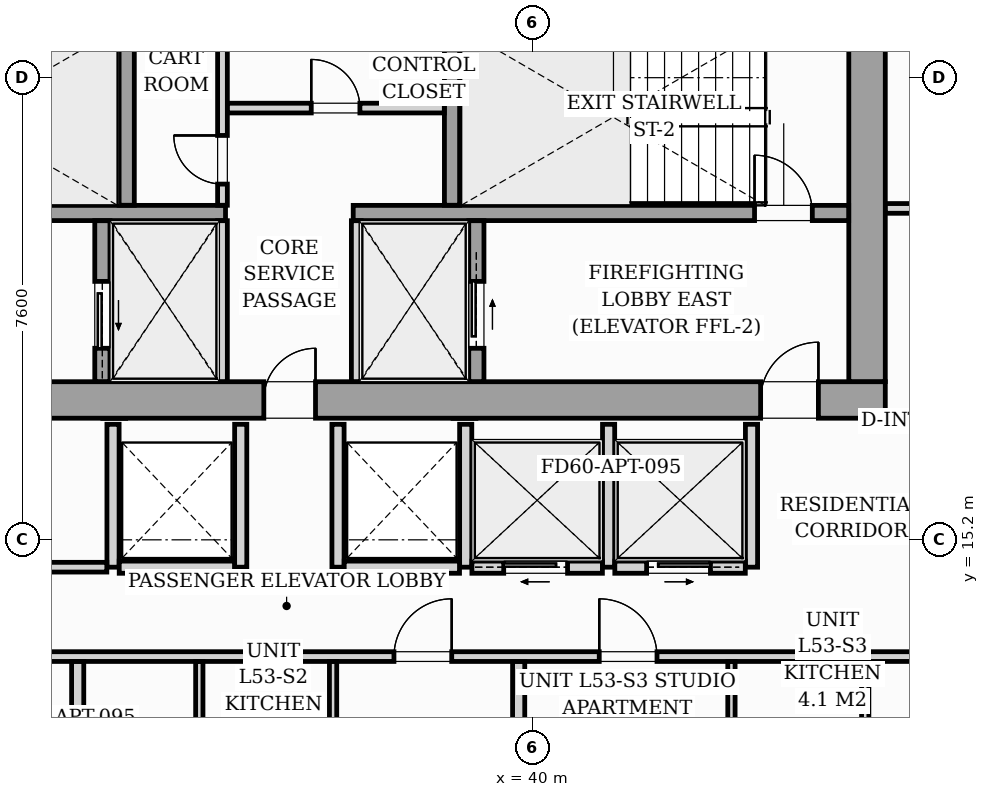
"""IFC4 building model, lengths in metres.
Left out: names, types, materials, properties, quantities, classifications, styles, units other than length and angle.
Written with IfcOpenShell. Run it as: python <this file> out.ifc"""

import sys

from ifc_helpers import new_model, si_unit, direction, frame, frame_2d, origin, origin_2d, place, context, subcontext, project, spatial, rectangle, i_section, extrude, source, transform, mapped, element, fill, save


model = new_model("IFC4")
c1 = context("Model", 3, precision=1e-05, world=origin(), true_north=direction((0.0, 1.0)))
c2 = subcontext(c1, "Body", "Model", "MODEL_VIEW")
j1 = project(units=[si_unit("LENGTHUNIT", "METRE"), si_unit("PLANEANGLEUNIT", "RADIAN")], contexts=[c1])
p1 = place(None, origin())
s1 = spatial("IfcSite", under=j1, at=p1, CompositionType="ELEMENT")
p2 = place(p1, origin())
s2 = spatial("IfcBuilding", under=s1, at=p2, CompositionType="ELEMENT")
p3 = place(p2, frame((0.0, 0.0, 185.8)))
s3 = spatial("IfcBuildingStorey", under=s2, at=p3, CompositionType="ELEMENT", Elevation=185.8)
m1 = source(origin(), c2, "Body", "SweptSolid", [
    extrude(i_section(OverallWidth=0.416, OverallDepth=0.446, WebThickness=0.039, FlangeThickness=0.063, FilletRadius=0.018, at=origin_2d()), origin(), (0.0, 0.0, 1.0), 3.196),
])
for number, where, z_axis, x_axis in (
    (1, (33.12, 17.4, 0.002), (0.0, 0.0, 1.0), (1.0, 0.0, 0.0)),
    (2, (38.88, 17.4, 0.002), (0.0, 0.0, 1.0), (1.0, 0.0, 0.0)),
    (3, (45.6, 17.4, 0.002), (0.0, 0.0, 1.0), (1.0, 0.0, 0.0)),
):
    element("IfcColumn", number, at=place(p3, frame(where, z_axis=z_axis, x_axis=x_axis)), inside=s3, PredefinedType="PILASTER", context=c2, shape_type="MappedRepresentation", body=[
        mapped(m1, transform((0.0, 0.0, 0.0), scale=1.0)),
    ])
p4 = place(p3, frame((26.2, 17.5, 0.0), z_axis=(0.0, 0.0, 1.0), x_axis=(1.0, 0.0, 0.0)))
e4 = element("IfcWall", 4, at=p4, inside=s3, PredefinedType="SHEAR", context=c2, shape_type="SweptSolid", body=[
    extrude(rectangle(XDim=19.6, YDim=0.6, at=frame_2d((9.8, 0.0))), origin(), (0.0, 0.0, 1.0), 3.2),
])
p5 = place(p4, frame((0.95, 0.0, 0.0)))
e5 = element("IfcOpeningElement", 5, at=p5, cuts=e4, PredefinedType="OPENING", context=c2, shape_type="SweptSolid", body=[
    extrude(rectangle(XDim=0.95, YDim=2.06, at=frame_2d((0.475, 1.03))), frame((0.0, 0.31, 0.0), z_axis=(0.0, -1.0, 0.0), x_axis=(1.0, 0.0, 0.0)), (0.0, 0.0, 1.0), 0.62),
])
p6 = place(p4, frame((9.38, 0.0, 0.0)))
e6 = element("IfcOpeningElement", 6, at=p6, cuts=e4, PredefinedType="OPENING", context=c2, shape_type="SweptSolid", body=[
    extrude(rectangle(XDim=0.85, YDim=2.0, at=frame_2d((0.425, 1.0))), frame((0.0, 0.31, 0.0), z_axis=(0.0, -1.0, 0.0), x_axis=(1.0, 0.0, 0.0)), (0.0, 0.0, 1.0), 0.62),
])
p7 = place(p4, frame((17.55, 0.0, 0.0)))
e7 = element("IfcOpeningElement", 7, at=p7, cuts=e4, PredefinedType="OPENING", context=c2, shape_type="SweptSolid", body=[
    extrude(rectangle(XDim=0.95, YDim=2.06, at=frame_2d((0.475, 1.03))), frame((0.0, 0.31, 0.0), z_axis=(0.0, -1.0, 0.0), x_axis=(1.0, 0.0, 0.0)), (0.0, 0.0, 1.0), 0.62),
])
p8 = place(p3, frame((45.5, 17.802, 0.0), z_axis=(0.0, 0.0, 1.0), x_axis=(0.0, 1.0, 0.0)))
e8 = element("IfcWall", 8, at=p8, inside=s3, PredefinedType="SHEAR", context=c2, shape_type="SweptSolid", body=[
    extrude(rectangle(XDim=5.796, YDim=0.6, at=frame_2d((2.898, 0.0))), origin(), (0.0, 0.0, 1.0), 3.2),
])
p9 = place(p3, frame((26.802, 20.575, 0.0), z_axis=(0.0, 0.0, 1.0), x_axis=(1.0, 0.0, 0.0)))
e9 = element("IfcWall", 9, at=p9, inside=s3, PredefinedType="SOLIDWALL", context=c2, shape_type="SweptSolid", body=[
    extrude(rectangle(XDim=8.148, YDim=0.25, at=frame_2d((4.074, 0.0))), origin(), (0.0, 0.0, 1.0), 3.2),
])
p10 = place(p9, frame((0.298, 0.0, 0.0)))
e10 = element("IfcOpeningElement", 10, at=p10, cuts=e9, PredefinedType="OPENING", context=c2, shape_type="SweptSolid", body=[
    extrude(rectangle(XDim=0.95, YDim=2.06, at=frame_2d((0.475, 1.03))), frame((0.0, 0.135, 0.0), z_axis=(0.0, -1.0, 0.0), x_axis=(1.0, 0.0, 0.0)), (0.0, 0.0, 1.0), 0.27),
])
p11 = place(p3, frame((37.05, 20.575, 0.0), z_axis=(0.0, 0.0, 1.0), x_axis=(1.0, 0.0, 0.0)))
e11 = element("IfcWall", 11, at=p11, inside=s3, PredefinedType="SOLIDWALL", context=c2, shape_type="SweptSolid", body=[
    extrude(rectangle(XDim=8.148, YDim=0.25, at=frame_2d((4.074, 0.0))), origin(), (0.0, 0.0, 1.0), 3.2),
])
p12 = place(p11, frame((6.6, 0.0, 0.0)))
e12 = element("IfcOpeningElement", 12, at=p12, cuts=e11, PredefinedType="OPENING", context=c2, shape_type="SweptSolid", body=[
    extrude(rectangle(XDim=0.95, YDim=2.06, at=frame_2d((0.475, 1.03))), frame((0.0, 0.135, 0.0), z_axis=(0.0, -1.0, 0.0), x_axis=(1.0, 0.0, 0.0)), (0.0, 0.0, 1.0), 0.27),
])
for number, where, z_axis, x_axis in (
    (13, (33.325, 20.702, 0.0), (0.0, 0.0, 1.0), (0.0, 1.0, 0.0)),
    (14, (38.675, 20.702, 0.0), (0.0, 0.0, 1.0), (0.0, 1.0, 0.0)),
):
    element("IfcWall", number, at=place(p3, frame(where, z_axis=z_axis, x_axis=x_axis)), inside=s3, PredefinedType="SOLIDWALL", context=c2, shape_type="SweptSolid", body=[
        extrude(rectangle(XDim=2.896, YDim=0.25, at=frame_2d((1.448, 0.0))), origin(), (0.0, 0.0, 1.0), 3.2),
    ])
p13 = place(p3, frame((32.925, 17.802, 0.0), z_axis=(0.0, 0.0, 1.0), x_axis=(0.0, 1.0, 0.0)))
e15 = element("IfcWall", 15, at=p13, inside=s3, PredefinedType="SOLIDWALL", context=c2, shape_type="SweptSolid", body=[
    extrude(rectangle(XDim=2.646, YDim=0.25, at=frame_2d((1.323, 0.0))), origin(), (0.0, 0.0, 1.0), 3.2),
])
p14 = place(p13, frame((0.548, 0.0, 0.0)))
e16 = element("IfcOpeningElement", 16, at=p14, cuts=e15, PredefinedType="OPENING", context=c2, shape_type="SweptSolid", body=[
    extrude(rectangle(XDim=1.1, YDim=2.08, at=frame_2d((0.55, 1.04))), frame((0.0, 0.135, 0.0), z_axis=(0.0, -1.0, 0.0), x_axis=(1.0, 0.0, 0.0)), (0.0, 0.0, 1.0), 0.27),
])
for number, where, z_axis, x_axis in (
    (17, (34.9, 17.802, 0.0), (0.0, 0.0, 1.0), (0.0, 1.0, 0.0)),
    (18, (37.1, 17.802, 0.0), (0.0, 0.0, 1.0), (0.0, 1.0, 0.0)),
):
    element("IfcWall", number, at=place(p3, frame(where, z_axis=z_axis, x_axis=x_axis)), inside=s3, PredefinedType="PARTITIONING", context=c2, shape_type="SweptSolid", body=[
        extrude(rectangle(XDim=2.646, YDim=0.16, at=frame_2d((1.323, 0.0))), origin(), (0.0, 0.0, 1.0), 2.94),
    ])
p15 = place(p3, frame((39.075, 17.802, 0.0), z_axis=(0.0, 0.0, 1.0), x_axis=(0.0, 1.0, 0.0)))
e19 = element("IfcWall", 19, at=p15, inside=s3, PredefinedType="SOLIDWALL", context=c2, shape_type="SweptSolid", body=[
    extrude(rectangle(XDim=2.646, YDim=0.25, at=frame_2d((1.323, 0.0))), origin(), (0.0, 0.0, 1.0), 3.2),
])
p16 = place(p15, frame((0.548, 0.0, 0.0)))
e20 = element("IfcOpeningElement", 20, at=p16, cuts=e19, PredefinedType="OPENING", context=c2, shape_type="SweptSolid", body=[
    extrude(rectangle(XDim=1.1, YDim=2.08, at=frame_2d((0.55, 1.04))), frame((0.0, 0.135, 0.0), z_axis=(0.0, -1.0, 0.0), x_axis=(1.0, 0.0, 0.0)), (0.0, 0.0, 1.0), 0.27),
])
p17 = place(p3, frame((34.9, 20.702, 0.0), z_axis=(0.0, 0.0, 1.0), x_axis=(0.0, 1.0, 0.0)))
e21 = element("IfcWall", 21, at=p17, inside=s3, PredefinedType="PARTITIONING", context=c2, shape_type="SweptSolid", body=[
    extrude(rectangle(XDim=2.896, YDim=0.16, at=frame_2d((1.448, 0.0))), origin(), (0.0, 0.0, 1.0), 2.94),
])
p18 = place(p17, frame((0.348, 0.0, 0.0)))
e22 = element("IfcOpeningElement", 22, at=p18, cuts=e21, PredefinedType="OPENING", context=c2, shape_type="SweptSolid", body=[
    extrude(rectangle(XDim=0.8, YDim=2.05, at=frame_2d((0.4, 1.025))), frame((0.0, 0.09, 0.0), z_axis=(0.0, -1.0, 0.0), x_axis=(1.0, 0.0, 0.0)), (0.0, 0.0, 1.0), 0.18),
])
p19 = place(p3, frame((34.982, 22.3, 0.0), z_axis=(0.0, 0.0, 1.0), x_axis=(1.0, 0.0, 0.0)))
e23 = element("IfcWall", 23, at=p19, inside=s3, PredefinedType="PARTITIONING", context=c2, shape_type="SweptSolid", body=[
    extrude(rectangle(XDim=3.566, YDim=0.16, at=frame_2d((1.783, 0.0))), origin(), (0.0, 0.0, 1.0), 2.94),
])
p20 = place(p19, frame((1.378, 0.0, 0.0)))
e24 = element("IfcOpeningElement", 24, at=p20, cuts=e23, PredefinedType="OPENING", context=c2, shape_type="SweptSolid", body=[
    extrude(rectangle(XDim=0.8, YDim=2.05, at=frame_2d((0.4, 1.025))), frame((0.0, 0.09, 0.0), z_axis=(0.0, -1.0, 0.0), x_axis=(1.0, 0.0, 0.0)), (0.0, 0.0, 1.0), 0.18),
])
p21 = place(p3, frame((33.1, 14.75, 0.0), z_axis=(0.0, 0.0, 1.0), x_axis=(0.0, 1.0, 0.0)))
e25 = element("IfcWall", 25, at=p21, inside=s3, PredefinedType="PARTITIONING", context=c2, shape_type="SweptSolid", body=[
    extrude(rectangle(XDim=2.35, YDim=0.2, at=frame_2d((1.175, 0.0))), origin(), (0.0, 0.0, 1.0), 2.94),
])
p22 = place(p3, frame((28.482, 14.75, 0.0), z_axis=(0.0, 0.0, 1.0), x_axis=(1.0, 0.0, 0.0)))
e26 = element("IfcWall", 26, at=p22, inside=s3, PredefinedType="PARTITIONING", context=c2, shape_type="SweptSolid", body=[
    extrude(rectangle(XDim=4.516, YDim=0.16, at=frame_2d((2.258, 0.0))), origin(), (0.0, 0.0, 1.0), 2.94),
])
p23 = place(p22, frame((1.868, 0.0, 0.0)))
e27 = element("IfcOpeningElement", 27, at=p23, cuts=e26, PredefinedType="OPENING", context=c2, shape_type="SweptSolid", body=[
    extrude(rectangle(XDim=0.8, YDim=2.05, at=frame_2d((0.4, 1.025))), frame((0.0, 0.09, 0.0), z_axis=(0.0, -1.0, 0.0), x_axis=(1.0, 0.0, 0.0)), (0.0, 0.0, 1.0), 0.18),
])
p24 = place(p3, frame((35.2, 14.75, 0.0), z_axis=(0.0, 0.0, 1.0), x_axis=(0.0, 1.0, 0.0)))
e28 = element("IfcWall", 28, at=p24, inside=s3, PredefinedType="PARTITIONING", context=c2, shape_type="SweptSolid", body=[
    extrude(rectangle(XDim=2.35, YDim=0.2, at=frame_2d((1.175, 0.0))), origin(), (0.0, 0.0, 1.0), 2.94),
])
p25 = place(p3, frame((33.202, 14.75, 0.0), z_axis=(0.0, 0.0, 1.0), x_axis=(1.0, 0.0, 0.0)))
e29 = element("IfcWall", 29, at=p25, inside=s3, PredefinedType="PARTITIONING", context=c2, shape_type="SweptSolid", body=[
    extrude(rectangle(XDim=1.896, YDim=0.2, at=frame_2d((0.948, 0.0))), origin(), (0.0, 0.0, 1.0), 2.94),
])
for number, where, z_axis, x_axis in (
    (30, (36.8, 14.75, 0.0), (0.0, 0.0, 1.0), (0.0, 1.0, 0.0)),
    (31, (38.9, 14.75, 0.0), (0.0, 0.0, 1.0), (0.0, 1.0, 0.0)),
):
    element("IfcWall", number, at=place(p3, frame(where, z_axis=z_axis, x_axis=x_axis)), inside=s3, PredefinedType="PARTITIONING", context=c2, shape_type="SweptSolid", body=[
        extrude(rectangle(XDim=2.35, YDim=0.2, at=frame_2d((1.175, 0.0))), origin(), (0.0, 0.0, 1.0), 2.94),
    ])
p26 = place(p3, frame((36.902, 14.75, 0.0), z_axis=(0.0, 0.0, 1.0), x_axis=(1.0, 0.0, 0.0)))
e32 = element("IfcWall", 32, at=p26, inside=s3, PredefinedType="PARTITIONING", context=c2, shape_type="SweptSolid", body=[
    extrude(rectangle(XDim=1.896, YDim=0.2, at=frame_2d((0.948, 0.0))), origin(), (0.0, 0.0, 1.0), 2.94),
])
for number, where, z_axis, x_axis in (
    (33, (41.25, 14.75, 0.0), (0.0, 0.0, 1.0), (0.0, 1.0, 0.0)),
    (34, (43.6, 14.75, 0.0), (0.0, 0.0, 1.0), (0.0, 1.0, 0.0)),
):
    element("IfcWall", number, at=place(p3, frame(where, z_axis=z_axis, x_axis=x_axis)), inside=s3, PredefinedType="PARTITIONING", context=c2, shape_type="SweptSolid", body=[
        extrude(rectangle(XDim=2.35, YDim=0.2, at=frame_2d((1.175, 0.0))), origin(), (0.0, 0.0, 1.0), 2.94),
    ])
p27 = place(p3, frame((39.002, 14.75, 0.0), z_axis=(0.0, 0.0, 1.0), x_axis=(1.0, 0.0, 0.0)))
e35 = element("IfcWall", 35, at=p27, inside=s3, PredefinedType="PARTITIONING", context=c2, shape_type="SweptSolid", body=[
    extrude(rectangle(XDim=2.146, YDim=0.2, at=frame_2d((1.073, 0.0))), origin(), (0.0, 0.0, 1.0), 2.94),
])
p28 = place(p27, frame((0.523, 0.0, 0.0)))
e36 = element("IfcOpeningElement", 36, at=p28, cuts=e35, PredefinedType="OPENING", context=c2, shape_type="SweptSolid", body=[
    extrude(rectangle(XDim=1.05, YDim=2.08, at=frame_2d((0.525, 1.04))), frame((0.0, 0.11, 0.0), z_axis=(0.0, -1.0, 0.0), x_axis=(1.0, 0.0, 0.0)), (0.0, 0.0, 1.0), 0.22),
])
p29 = place(p3, frame((41.352, 14.75, 0.0), z_axis=(0.0, 0.0, 1.0), x_axis=(1.0, 0.0, 0.0)))
e37 = element("IfcWall", 37, at=p29, inside=s3, PredefinedType="PARTITIONING", context=c2, shape_type="SweptSolid", body=[
    extrude(rectangle(XDim=2.146, YDim=0.2, at=frame_2d((1.073, 0.0))), origin(), (0.0, 0.0, 1.0), 2.94),
])
p30 = place(p29, frame((0.523, 0.0, 0.0)))
e38 = element("IfcOpeningElement", 38, at=p30, cuts=e37, PredefinedType="OPENING", context=c2, shape_type="SweptSolid", body=[
    extrude(rectangle(XDim=1.05, YDim=2.08, at=frame_2d((0.525, 1.04))), frame((0.0, 0.11, 0.0), z_axis=(0.0, -1.0, 0.0), x_axis=(1.0, 0.0, 0.0)), (0.0, 0.0, 1.0), 0.22),
])
p31 = place(p3, frame((26.12, 13.28, 0.0), z_axis=(0.0, 0.0, 1.0), x_axis=(1.0, 0.0, 0.0)))
e39 = element("IfcWall", 39, at=p31, inside=s3, PredefinedType="PARTITIONING", context=c2, shape_type="SweptSolid", body=[
    extrude(rectangle(XDim=21.33, YDim=0.16, at=frame_2d((10.665, 0.0))), origin(), (0.0, 0.0, 1.0), 2.94),
])
p32 = place(p31, frame((4.704, 0.0, 0.0)))
e40 = element("IfcOpeningElement", 40, at=p32, cuts=e39, PredefinedType="OPENING", context=c2, shape_type="SweptSolid", body=[
    extrude(rectangle(XDim=0.95, YDim=2.06, at=frame_2d((0.475, 1.03))), frame((0.0, 0.09, 0.0), z_axis=(0.0, -1.0, 0.0), x_axis=(1.0, 0.0, 0.0)), (0.0, 0.0, 1.0), 0.18),
])
p33 = place(p31, frame((11.6, 0.0, 0.0)))
e41 = element("IfcOpeningElement", 41, at=p33, cuts=e39, PredefinedType="OPENING", context=c2, shape_type="SweptSolid", body=[
    extrude(rectangle(XDim=0.95, YDim=2.06, at=frame_2d((0.475, 1.03))), frame((0.0, 0.09, 0.0), z_axis=(0.0, -1.0, 0.0), x_axis=(1.0, 0.0, 0.0)), (0.0, 0.0, 1.0), 0.18),
])
p34 = place(p31, frame((14.976, 0.0, 0.0)))
e42 = element("IfcOpeningElement", 42, at=p34, cuts=e39, PredefinedType="OPENING", context=c2, shape_type="SweptSolid", body=[
    extrude(rectangle(XDim=0.95, YDim=2.06, at=frame_2d((0.475, 1.03))), frame((0.0, 0.09, 0.0), z_axis=(0.0, -1.0, 0.0), x_axis=(1.0, 0.0, 0.0)), (0.0, 0.0, 1.0), 0.18),
])
p35 = place(p3, frame((45.802, 20.65, 0.0), z_axis=(0.0, 0.0, 1.0), x_axis=(1.0, 0.0, 0.0)))
e43 = element("IfcWall", 43, at=p35, inside=s3, PredefinedType="PARTITIONING", context=c2, shape_type="SweptSolid", body=[
    extrude(rectangle(XDim=1.566, YDim=0.16, at=frame_2d((0.783, 0.0))), origin(), (0.0, 0.0, 1.0), 2.94),
])
p36 = place(p3, frame((32.519, 7.877, 0.0), z_axis=(0.0, 0.0, 1.0), x_axis=(0.0, 1.0, 0.0)))
e44 = element("IfcWall", 44, at=p36, inside=s3, PredefinedType="PARTITIONING", context=c2, shape_type="SweptSolid", body=[
    extrude(rectangle(XDim=5.321, YDim=0.2, at=frame_2d((2.66, 0.0))), origin(), (0.0, 0.0, 1.0), 2.94),
])
for number, where, z_axis, x_axis in (
    (45, (36.719, 11.092, 0.0), (0.0, 0.0, 1.0), (0.0, 1.0, 0.0)),
    (46, (34.519, 11.092, 0.0), (0.0, 0.0, 1.0), (0.0, 1.0, 0.0)),
):
    element("IfcWall", number, at=place(p3, frame(where, z_axis=z_axis, x_axis=x_axis)), inside=s3, PredefinedType="PARTITIONING", context=c2, shape_type="SweptSolid", body=[
        extrude(rectangle(XDim=2.106, YDim=0.12, at=frame_2d((1.053, 0.0))), origin(), (0.0, 0.0, 1.0), 2.94),
    ])
p37 = place(p3, frame((39.771, 8.393, 0.0), z_axis=(0.0, 0.0, 1.0), x_axis=(0.0, 1.0, 0.0)))
e47 = element("IfcWall", 47, at=p37, inside=s3, PredefinedType="PARTITIONING", context=c2, shape_type="SweptSolid", body=[
    extrude(rectangle(XDim=4.805, YDim=0.2, at=frame_2d((2.403, 0.0))), origin(), (0.0, 0.0, 1.0), 2.94),
])
for number, where, z_axis, x_axis in (
    (48, (43.27, 11.234, 0.0), (0.0, 0.0, 1.0), (0.0, 1.0, 0.0)),
    (49, (45.47, 11.234, 0.0), (0.0, 0.0, 1.0), (0.0, 1.0, 0.0)),
):
    element("IfcWall", number, at=place(p3, frame(where, z_axis=z_axis, x_axis=x_axis)), inside=s3, PredefinedType="PARTITIONING", context=c2, shape_type="SweptSolid", body=[
        extrude(rectangle(XDim=1.964, YDim=0.12, at=frame_2d((0.982, 0.0))), origin(), (0.0, 0.0, 1.0), 2.94),
    ])
m2 = source(origin(), c2, "Body", "SweptSolid", [
    extrude(rectangle(XDim=0.85, YDim=2.0, at=frame_2d((0.425, 1.0))), frame((0.0, 0.025, 0.0), z_axis=(0.0, -1.0, 0.0), x_axis=(1.0, 0.0, 0.0)), (0.0, 0.0, 1.0), 0.05),
])
p38 = place(p6, origin())
e50 = element("IfcDoor", 50, at=p38, inside=s3, OperationType="SINGLE_SWING_RIGHT", PredefinedType="DOOR", context=c2, shape_type="MappedRepresentation", body=[
    mapped(m2, transform((0.0, 0.0, 0.0), scale=1.0)),
])
fill(e6, e50)
m3 = source(origin(), c2, "Body", "SweptSolid", [
    extrude(rectangle(XDim=0.95, YDim=2.06, at=frame_2d((0.475, 1.03))), frame((0.0, 0.025, 0.0), z_axis=(0.0, -1.0, 0.0), x_axis=(1.0, 0.0, 0.0)), (0.0, 0.0, 1.0), 0.05),
])
p39 = place(p7, origin())
e51 = element("IfcDoor", 51, at=p39, inside=s3, OperationType="SINGLE_SWING_RIGHT", PredefinedType="DOOR", context=c2, shape_type="MappedRepresentation", body=[
    mapped(m3, transform((0.0, 0.0, 0.0), scale=1.0)),
])
fill(e7, e51)
p40 = place(p12, origin())
e52 = element("IfcDoor", 52, at=p40, inside=s3, OperationType="SINGLE_SWING_LEFT", PredefinedType="DOOR", context=c2, shape_type="MappedRepresentation", body=[
    mapped(m3, transform((0.0, 0.0, 0.0), scale=1.0)),
])
fill(e12, e52)
m4 = source(origin(), c2, "Body", "SweptSolid", [
    extrude(rectangle(XDim=1.1, YDim=2.08, at=frame_2d((0.55, 1.04))), frame((0.0, 0.025, 0.0), z_axis=(0.0, -1.0, 0.0), x_axis=(1.0, 0.0, 0.0)), (0.0, 0.0, 1.0), 0.05),
])
p41 = place(p14, origin())
e53 = element("IfcDoor", 53, at=p41, inside=s3, OperationType="SLIDING_TO_LEFT", PredefinedType="DOOR", context=c2, shape_type="MappedRepresentation", body=[
    mapped(m4, transform((0.0, 0.0, 0.0), scale=1.0)),
])
fill(e16, e53)
p42 = place(p16, origin())
e54 = element("IfcDoor", 54, at=p42, inside=s3, OperationType="SLIDING_TO_RIGHT", PredefinedType="DOOR", context=c2, shape_type="MappedRepresentation", body=[
    mapped(m4, transform((0.0, 0.0, 0.0), scale=1.0)),
])
fill(e20, e54)
m5 = source(origin(), c2, "Body", "SweptSolid", [
    extrude(rectangle(XDim=0.8, YDim=2.05, at=frame_2d((0.4, 1.025))), frame((0.0, 0.025, 0.0), z_axis=(0.0, -1.0, 0.0), x_axis=(1.0, 0.0, 0.0)), (0.0, 0.0, 1.0), 0.05),
])
p43 = place(p18, origin())
e55 = element("IfcDoor", 55, at=p43, inside=s3, OperationType="SINGLE_SWING_RIGHT", PredefinedType="DOOR", context=c2, shape_type="MappedRepresentation", body=[
    mapped(m5, transform((0.0, 0.0, 0.0), scale=1.0)),
])
fill(e22, e55)
p44 = place(p20, origin())
e56 = element("IfcDoor", 56, at=p44, inside=s3, OperationType="SINGLE_SWING_LEFT", PredefinedType="DOOR", context=c2, shape_type="MappedRepresentation", body=[
    mapped(m5, transform((0.0, 0.0, 0.0), scale=1.0)),
])
fill(e24, e56)
m6 = source(origin(), c2, "Body", "SweptSolid", [
    extrude(rectangle(XDim=1.05, YDim=2.08, at=frame_2d((0.525, 1.04))), frame((0.0, 0.025, 0.0), z_axis=(0.0, -1.0, 0.0), x_axis=(1.0, 0.0, 0.0)), (0.0, 0.0, 1.0), 0.05),
])
p45 = place(p28, origin())
e57 = element("IfcDoor", 57, at=p45, inside=s3, OperationType="SLIDING_TO_LEFT", PredefinedType="DOOR", context=c2, shape_type="MappedRepresentation", body=[
    mapped(m6, transform((0.0, 0.0, 0.0), scale=1.0)),
])
fill(e36, e57)
p46 = place(p30, origin())
e58 = element("IfcDoor", 58, at=p46, inside=s3, OperationType="SLIDING_TO_RIGHT", PredefinedType="DOOR", context=c2, shape_type="MappedRepresentation", body=[
    mapped(m6, transform((0.0, 0.0, 0.0), scale=1.0)),
])
fill(e38, e58)
m7 = source(origin(), c2, "Body", "SweptSolid", [
    extrude(rectangle(XDim=0.95, YDim=2.06, at=frame_2d((0.475, 1.03))), frame((0.0, 0.025, 0.0), z_axis=(0.0, -1.0, 0.0), x_axis=(1.0, 0.0, 0.0)), (0.0, 0.0, 1.0), 0.05),
])
p47 = place(p33, origin())
e59 = element("IfcDoor", 59, at=p47, inside=s3, OperationType="SINGLE_SWING_RIGHT", PredefinedType="DOOR", context=c2, shape_type="MappedRepresentation", body=[
    mapped(m7, transform((0.0, 0.0, 0.0), scale=1.0)),
])
fill(e41, e59)
p48 = place(p34, origin())
e60 = element("IfcDoor", 60, at=p48, inside=s3, OperationType="SINGLE_SWING_LEFT", PredefinedType="DOOR", context=c2, shape_type="MappedRepresentation", body=[
    mapped(m7, transform((0.0, 0.0, 0.0), scale=1.0)),
])
fill(e42, e60)
save(model, sys.argv[1])
